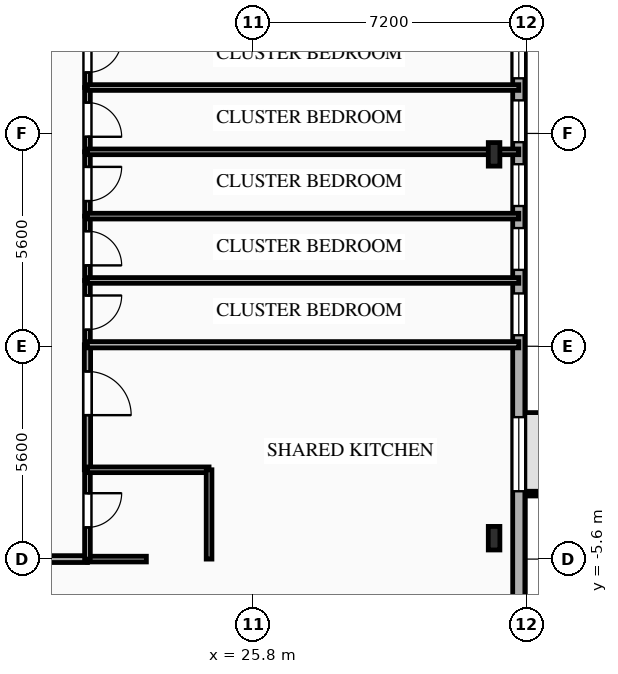
"""IFC4 building model, lengths in metres.
Left out: names, types, materials, properties, quantities, classifications, styles, units other than length and angle.
Written with IfcOpenShell. Run it as: python <this file> out.ifc"""

import sys

from ifc_helpers import new_model, si_unit, direction, frame, frame_2d, origin, origin_2d, place, context, subcontext, project, spatial, rectangle, i_section, extrude, element, fill, save


model = new_model("IFC4")
c1 = context("Model", 3, precision=1e-05, world=origin(), true_north=direction((0.0, 1.0)))
c2 = subcontext(c1, "Body", "Model", "MODEL_VIEW")
j1 = project(units=[si_unit("LENGTHUNIT", "METRE"), si_unit("PLANEANGLEUNIT", "RADIAN")], contexts=[c1])
p1 = place(None, origin())
s1 = spatial("IfcSite", under=j1, at=p1, CompositionType="ELEMENT")
p2 = place(p1, origin())
s2 = spatial("IfcBuilding", under=s1, at=p2, CompositionType="ELEMENT")
p3 = place(p2, frame((0.0, 0.0, 60.5)))
s3 = spatial("IfcBuildingStorey", under=s2, at=p3, CompositionType="ELEMENT", Elevation=60.5)
for number, where, z_axis, x_axis in (
    (1, (32.15, -5.05, 0.0), (0.0, 0.0, 1.0), (1.0, 0.0, 0.0)),
    (2, (32.15, 5.05, 0.0), (0.0, 0.0, 1.0), (1.0, 0.0, 0.0)),
):
    element("IfcColumn", number, at=place(p3, frame(where, z_axis=z_axis, x_axis=x_axis)), inside=s3, PredefinedType="COLUMN", context=c2, shape_type="SweptSolid", body=[
        extrude(i_section(OverallWidth=0.305, OverallDepth=0.62, WebThickness=0.021, FlangeThickness=0.04, FilletRadius=0.027, at=origin_2d()), origin(), (0.0, 0.0, 1.0), 3.35),
    ])
p4 = place(p3, frame((32.8, 15.8, 0.0), z_axis=(0.0, 0.0, 1.0), x_axis=(0.0, -1.0, 0.0)))
e3 = element("IfcWall", 3, at=p4, inside=s3, PredefinedType="SOLIDWALL", context=c2, shape_type="SweptSolid", body=[
    extrude(rectangle(XDim=31.6, YDim=0.32, at=frame_2d((15.8, 0.0))), origin(), (0.0, 0.0, 1.0), 3.035),
])
p5 = place(p4, frame((7.65, 0.0, 0.85)))
e4 = element("IfcOpeningElement", 4, at=p5, cuts=e3, PredefinedType="OPENING", context=c2, shape_type="SweptSolid", body=[
    extrude(rectangle(XDim=1.1, YDim=1.85, at=frame_2d((0.55, 0.925))), frame((0.0, 0.17, 0.0), z_axis=(0.0, -1.0, 0.0), x_axis=(1.0, 0.0, 0.0)), (0.0, 0.0, 1.0), 0.34),
])
p6 = place(p4, frame((9.33, 0.0, 0.85)))
e5 = element("IfcOpeningElement", 5, at=p6, cuts=e3, PredefinedType="OPENING", context=c2, shape_type="SweptSolid", body=[
    extrude(rectangle(XDim=1.1, YDim=1.85, at=frame_2d((0.55, 0.925))), frame((0.0, 0.17, 0.0), z_axis=(0.0, -1.0, 0.0), x_axis=(1.0, 0.0, 0.0)), (0.0, 0.0, 1.0), 0.34),
])
p7 = place(p4, frame((11.01, 0.0, 0.85)))
e6 = element("IfcOpeningElement", 6, at=p7, cuts=e3, PredefinedType="OPENING", context=c2, shape_type="SweptSolid", body=[
    extrude(rectangle(XDim=1.1, YDim=1.85, at=frame_2d((0.55, 0.925))), frame((0.0, 0.17, 0.0), z_axis=(0.0, -1.0, 0.0), x_axis=(1.0, 0.0, 0.0)), (0.0, 0.0, 1.0), 0.34),
])
p8 = place(p4, frame((12.69, 0.0, 0.85)))
e7 = element("IfcOpeningElement", 7, at=p8, cuts=e3, PredefinedType="OPENING", context=c2, shape_type="SweptSolid", body=[
    extrude(rectangle(XDim=1.1, YDim=1.85, at=frame_2d((0.55, 0.925))), frame((0.0, 0.17, 0.0), z_axis=(0.0, -1.0, 0.0), x_axis=(1.0, 0.0, 0.0)), (0.0, 0.0, 1.0), 0.34),
])
p9 = place(p4, frame((14.41, 0.0, 0.85)))
e8 = element("IfcOpeningElement", 8, at=p9, cuts=e3, PredefinedType="OPENING", context=c2, shape_type="SweptSolid", body=[
    extrude(rectangle(XDim=1.1, YDim=1.85, at=frame_2d((0.55, 0.925))), frame((0.0, 0.17, 0.0), z_axis=(0.0, -1.0, 0.0), x_axis=(1.0, 0.0, 0.0)), (0.0, 0.0, 1.0), 0.34),
])
p10 = place(p4, frame((17.665, 0.0, 0.85)))
e9 = element("IfcOpeningElement", 9, at=p10, cuts=e3, PredefinedType="OPENING", context=c2, shape_type="SweptSolid", body=[
    extrude(rectangle(XDim=1.95, YDim=1.85, at=frame_2d((0.975, 0.925))), frame((0.0, 0.17, 0.0), z_axis=(0.0, -1.0, 0.0), x_axis=(1.0, 0.0, 0.0)), (0.0, 0.0, 1.0), 0.34),
])
p11 = place(p3, frame((18.8, -5.6, 0.0), z_axis=(0.0, 0.0, 1.0), x_axis=(1.0, 0.0, 0.0)))
e10 = element("IfcWall", 10, at=p11, inside=s3, PredefinedType="PARTITIONING", context=c2, shape_type="SweptSolid", body=[
    extrude(rectangle(XDim=2.65, YDim=0.18, at=frame_2d((1.325, 0.0))), origin(), (0.0, 0.0, 1.0), 3.035),
])
p12 = place(p3, frame((21.45, -5.6, 0.0), z_axis=(0.0, 0.0, 1.0), x_axis=(1.0, 0.0, 0.0)))
e11 = element("IfcWall", 11, at=p12, inside=s3, PredefinedType="PLUMBINGWALL", context=c2, shape_type="SweptSolid", body=[
    extrude(rectangle(XDim=1.55, YDim=0.15, at=frame_2d((0.775, 0.0))), origin(), (0.0, 0.0, 1.0), 3.035),
])
p13 = place(p3, frame((21.45, -3.25, 0.0), z_axis=(0.0, 0.0, 1.0), x_axis=(0.0, -1.0, 0.0)))
e12 = element("IfcWall", 12, at=p13, inside=s3, PredefinedType="PLUMBINGWALL", context=c2, shape_type="SweptSolid", body=[
    extrude(rectangle(XDim=2.35, YDim=0.15, at=frame_2d((1.175, 0.0))), origin(), (0.0, 0.0, 1.0), 3.035),
])
p14 = place(p13, frame((0.616, 0.0, 0.0)))
e13 = element("IfcOpeningElement", 13, at=p14, cuts=e12, PredefinedType="OPENING", context=c2, shape_type="SweptSolid", body=[
    extrude(rectangle(XDim=0.9, YDim=2.1, at=frame_2d((0.45, 1.05))), frame((0.0, 0.085, 0.0), z_axis=(0.0, -1.0, 0.0), x_axis=(1.0, 0.0, 0.0)), (0.0, 0.0, 1.0), 0.17),
])
p15 = place(p3, frame((21.45, 0.04, 0.0), z_axis=(0.0, 0.0, 1.0), x_axis=(0.0, -1.0, 0.0)))
e14 = element("IfcWall", 14, at=p15, inside=s3, PredefinedType="PARTITIONING", context=c2, shape_type="SweptSolid", body=[
    extrude(rectangle(XDim=3.29, YDim=0.165, at=frame_2d((1.645, 0.0))), origin(), (0.0, 0.0, 1.0), 3.035),
])
p16 = place(p15, frame((0.702, 0.0, 0.0)))
e15 = element("IfcOpeningElement", 15, at=p16, cuts=e14, PredefinedType="OPENING", context=c2, shape_type="SweptSolid", body=[
    extrude(rectangle(XDim=1.15, YDim=2.15, at=frame_2d((0.575, 1.075))), frame((0.0, 0.093, 0.0), z_axis=(0.0, -1.0, 0.0), x_axis=(1.0, 0.0, 0.0)), (0.0, 0.0, 1.0), 0.185),
])
p17 = place(p3, frame((21.45, 1.732, 0.0), z_axis=(0.0, 0.0, 1.0), x_axis=(0.0, -1.0, 0.0)))
e16 = element("IfcWall", 16, at=p17, inside=s3, PredefinedType="PARTITIONING", context=c2, shape_type="SweptSolid", body=[
    extrude(rectangle(XDim=1.692, YDim=0.15, at=frame_2d((0.846, 0.0))), origin(), (0.0, 0.0, 1.0), 3.035),
])
p18 = place(p17, frame((0.396, 0.0, 0.0)))
e17 = element("IfcOpeningElement", 17, at=p18, cuts=e16, PredefinedType="OPENING", context=c2, shape_type="SweptSolid", body=[
    extrude(rectangle(XDim=0.9, YDim=2.1, at=frame_2d((0.45, 1.05))), frame((0.0, 0.085, 0.0), z_axis=(0.0, -1.0, 0.0), x_axis=(1.0, 0.0, 0.0)), (0.0, 0.0, 1.0), 0.17),
])
p19 = place(p3, frame((21.45, 3.424, 0.0), z_axis=(0.0, 0.0, 1.0), x_axis=(0.0, -1.0, 0.0)))
e18 = element("IfcWall", 18, at=p19, inside=s3, PredefinedType="PARTITIONING", context=c2, shape_type="SweptSolid", body=[
    extrude(rectangle(XDim=1.692, YDim=0.15, at=frame_2d((0.846, 0.0))), origin(), (0.0, 0.0, 1.0), 3.035),
])
p20 = place(p19, frame((0.396, 0.0, 0.0)))
e19 = element("IfcOpeningElement", 19, at=p20, cuts=e18, PredefinedType="OPENING", context=c2, shape_type="SweptSolid", body=[
    extrude(rectangle(XDim=0.9, YDim=2.1, at=frame_2d((0.45, 1.05))), frame((0.0, 0.085, 0.0), z_axis=(0.0, -1.0, 0.0), x_axis=(1.0, 0.0, 0.0)), (0.0, 0.0, 1.0), 0.17),
])
p21 = place(p3, frame((21.45, 5.116, 0.0), z_axis=(0.0, 0.0, 1.0), x_axis=(0.0, -1.0, 0.0)))
e20 = element("IfcWall", 20, at=p21, inside=s3, PredefinedType="PARTITIONING", context=c2, shape_type="SweptSolid", body=[
    extrude(rectangle(XDim=1.692, YDim=0.15, at=frame_2d((0.846, 0.0))), origin(), (0.0, 0.0, 1.0), 3.035),
])
p22 = place(p21, frame((0.396, 0.0, 0.0)))
e21 = element("IfcOpeningElement", 21, at=p22, cuts=e20, PredefinedType="OPENING", context=c2, shape_type="SweptSolid", body=[
    extrude(rectangle(XDim=0.9, YDim=2.1, at=frame_2d((0.45, 1.05))), frame((0.0, 0.085, 0.0), z_axis=(0.0, -1.0, 0.0), x_axis=(1.0, 0.0, 0.0)), (0.0, 0.0, 1.0), 0.17),
])
p23 = place(p3, frame((21.45, 6.808, 0.0), z_axis=(0.0, 0.0, 1.0), x_axis=(0.0, -1.0, 0.0)))
e22 = element("IfcWall", 22, at=p23, inside=s3, PredefinedType="PARTITIONING", context=c2, shape_type="SweptSolid", body=[
    extrude(rectangle(XDim=1.692, YDim=0.15, at=frame_2d((0.846, 0.0))), origin(), (0.0, 0.0, 1.0), 3.035),
])
p24 = place(p23, frame((0.396, 0.0, 0.0)))
e23 = element("IfcOpeningElement", 23, at=p24, cuts=e22, PredefinedType="OPENING", context=c2, shape_type="SweptSolid", body=[
    extrude(rectangle(XDim=0.9, YDim=2.1, at=frame_2d((0.45, 1.05))), frame((0.0, 0.085, 0.0), z_axis=(0.0, -1.0, 0.0), x_axis=(1.0, 0.0, 0.0)), (0.0, 0.0, 1.0), 0.17),
])
p25 = place(p3, frame((21.45, 8.5, 0.0), z_axis=(0.0, 0.0, 1.0), x_axis=(0.0, -1.0, 0.0)))
e24 = element("IfcWall", 24, at=p25, inside=s3, PredefinedType="PARTITIONING", context=c2, shape_type="SweptSolid", body=[
    extrude(rectangle(XDim=1.692, YDim=0.15, at=frame_2d((0.846, 0.0))), origin(), (0.0, 0.0, 1.0), 3.035),
])
p26 = place(p25, frame((0.396, 0.0, 0.0)))
e25 = element("IfcOpeningElement", 25, at=p26, cuts=e24, PredefinedType="OPENING", context=c2, shape_type="SweptSolid", body=[
    extrude(rectangle(XDim=0.9, YDim=2.1, at=frame_2d((0.45, 1.05))), frame((0.0, 0.085, 0.0), z_axis=(0.0, -1.0, 0.0), x_axis=(1.0, 0.0, 0.0)), (0.0, 0.0, 1.0), 0.17),
])
p27 = place(p3, frame((21.45, -3.25, 0.0), z_axis=(0.0, 0.0, 1.0), x_axis=(1.0, 0.0, 0.0)))
e26 = element("IfcWall", 26, at=p27, inside=s3, PredefinedType="PLUMBINGWALL", context=c2, shape_type="SweptSolid", body=[
    extrude(rectangle(XDim=3.2, YDim=0.15, at=frame_2d((1.6, 0.0))), origin(), (0.0, 0.0, 1.0), 2.52),
])
p28 = place(p3, frame((24.65, -3.25, 0.0), z_axis=(0.0, 0.0, 1.0), x_axis=(0.0, -1.0, 0.0)))
e27 = element("IfcWall", 27, at=p28, inside=s3, PredefinedType="PLUMBINGWALL", context=c2, shape_type="SweptSolid", body=[
    extrude(rectangle(XDim=2.35, YDim=0.15, at=frame_2d((1.175, 0.0))), origin(), (0.0, 0.0, 1.0), 3.035),
])
p29 = place(p3, frame((21.45, 0.04, 0.0), z_axis=(0.0, 0.0, 1.0), x_axis=(1.0, 0.0, 0.0)))
e28 = element("IfcWall", 28, at=p29, inside=s3, PredefinedType="PARTITIONING", context=c2, shape_type="SweptSolid", body=[
    extrude(rectangle(XDim=11.35, YDim=0.165, at=frame_2d((5.675, 0.0))), origin(), (0.0, 0.0, 1.0), 3.035),
])
p30 = place(p3, frame((21.45, 1.732, 0.0), z_axis=(0.0, 0.0, 1.0), x_axis=(1.0, 0.0, 0.0)))
e29 = element("IfcWall", 29, at=p30, inside=s3, PredefinedType="PARTITIONING", context=c2, shape_type="SweptSolid", body=[
    extrude(rectangle(XDim=11.35, YDim=0.15, at=frame_2d((5.675, 0.0))), origin(), (0.0, 0.0, 1.0), 3.035),
])
for number, where, z_axis, x_axis in (
    (30, (21.45, 3.424, 0.0), (0.0, 0.0, 1.0), (1.0, 0.0, 0.0)),
    (31, (21.45, 5.116, 0.0), (0.0, 0.0, 1.0), (1.0, 0.0, 0.0)),
):
    element("IfcWall", number, at=place(p3, frame(where, z_axis=z_axis, x_axis=x_axis)), inside=s3, PredefinedType="PARTITIONING", context=c2, shape_type="SweptSolid", body=[
        extrude(rectangle(XDim=11.35, YDim=0.15, at=frame_2d((5.675, 0.0))), origin(), (0.0, 0.0, 1.0), 2.52),
    ])
p31 = place(p3, frame((21.45, 6.808, 0.0), z_axis=(0.0, 0.0, 1.0), x_axis=(1.0, 0.0, 0.0)))
e32 = element("IfcWall", 32, at=p31, inside=s3, PredefinedType="PARTITIONING", context=c2, shape_type="SweptSolid", body=[
    extrude(rectangle(XDim=11.35, YDim=0.15, at=frame_2d((5.675, 0.0))), origin(), (0.0, 0.0, 1.0), 3.035),
])
p32 = place(p5, origin())
e33 = element("IfcWindow", 33, at=p32, inside=s3, PartitioningType="SINGLE_PANEL", PredefinedType="WINDOW", context=c2, shape_type="SweptSolid", body=[
    extrude(rectangle(XDim=1.1, YDim=1.85, at=frame_2d((0.55, 0.925))), frame((0.0, 0.03, 0.0), z_axis=(0.0, -1.0, 0.0), x_axis=(1.0, 0.0, 0.0)), (0.0, 0.0, 1.0), 0.06),
])
fill(e4, e33)
p33 = place(p6, origin())
e34 = element("IfcWindow", 34, at=p33, inside=s3, PartitioningType="SINGLE_PANEL", PredefinedType="WINDOW", context=c2, shape_type="SweptSolid", body=[
    extrude(rectangle(XDim=1.1, YDim=1.85, at=frame_2d((0.55, 0.925))), frame((0.0, 0.03, 0.0), z_axis=(0.0, -1.0, 0.0), x_axis=(1.0, 0.0, 0.0)), (0.0, 0.0, 1.0), 0.06),
])
fill(e5, e34)
p34 = place(p7, origin())
e35 = element("IfcWindow", 35, at=p34, inside=s3, PartitioningType="SINGLE_PANEL", PredefinedType="WINDOW", context=c2, shape_type="SweptSolid", body=[
    extrude(rectangle(XDim=1.1, YDim=1.85, at=frame_2d((0.55, 0.925))), frame((0.0, 0.03, 0.0), z_axis=(0.0, -1.0, 0.0), x_axis=(1.0, 0.0, 0.0)), (0.0, 0.0, 1.0), 0.06),
])
fill(e6, e35)
p35 = place(p8, origin())
e36 = element("IfcWindow", 36, at=p35, inside=s3, PartitioningType="SINGLE_PANEL", PredefinedType="WINDOW", context=c2, shape_type="SweptSolid", body=[
    extrude(rectangle(XDim=1.1, YDim=1.85, at=frame_2d((0.55, 0.925))), frame((0.0, 0.03, 0.0), z_axis=(0.0, -1.0, 0.0), x_axis=(1.0, 0.0, 0.0)), (0.0, 0.0, 1.0), 0.06),
])
fill(e7, e36)
p36 = place(p9, origin())
e37 = element("IfcWindow", 37, at=p36, inside=s3, PartitioningType="SINGLE_PANEL", PredefinedType="WINDOW", context=c2, shape_type="SweptSolid", body=[
    extrude(rectangle(XDim=1.1, YDim=1.85, at=frame_2d((0.55, 0.925))), frame((0.0, 0.03, 0.0), z_axis=(0.0, -1.0, 0.0), x_axis=(1.0, 0.0, 0.0)), (0.0, 0.0, 1.0), 0.06),
])
fill(e8, e37)
p37 = place(p10, origin())
e38 = element("IfcWindow", 38, at=p37, inside=s3, PartitioningType="SINGLE_PANEL", PredefinedType="WINDOW", context=c2, shape_type="SweptSolid", body=[
    extrude(rectangle(XDim=1.95, YDim=1.85, at=frame_2d((0.975, 0.925))), frame((0.0, 0.03, 0.0), z_axis=(0.0, -1.0, 0.0), x_axis=(1.0, 0.0, 0.0)), (0.0, 0.0, 1.0), 0.06),
])
fill(e9, e38)
p38 = place(p14, origin())
e39 = element("IfcDoor", 39, at=p38, inside=s3, OperationType="SINGLE_SWING_LEFT", PredefinedType="DOOR", context=c2, shape_type="SweptSolid", body=[
    extrude(rectangle(XDim=0.9, YDim=2.1, at=frame_2d((0.45, 1.05))), frame((0.0, 0.025, 0.0), z_axis=(0.0, -1.0, 0.0), x_axis=(1.0, 0.0, 0.0)), (0.0, 0.0, 1.0), 0.05),
])
fill(e13, e39)
p39 = place(p16, origin())
e40 = element("IfcDoor", 40, at=p39, inside=s3, OperationType="SINGLE_SWING_RIGHT", PredefinedType="DOOR", context=c2, shape_type="SweptSolid", body=[
    extrude(rectangle(XDim=1.15, YDim=2.15, at=frame_2d((0.575, 1.075))), frame((0.0, 0.025, 0.0), z_axis=(0.0, -1.0, 0.0), x_axis=(1.0, 0.0, 0.0)), (0.0, 0.0, 1.0), 0.05),
])
fill(e15, e40)
p40 = place(p18, origin())
e41 = element("IfcDoor", 41, at=p40, inside=s3, OperationType="SINGLE_SWING_LEFT", PredefinedType="DOOR", context=c2, shape_type="SweptSolid", body=[
    extrude(rectangle(XDim=0.9, YDim=2.1, at=frame_2d((0.45, 1.05))), frame((0.0, 0.025, 0.0), z_axis=(0.0, -1.0, 0.0), x_axis=(1.0, 0.0, 0.0)), (0.0, 0.0, 1.0), 0.05),
])
fill(e17, e41)
p41 = place(p20, origin())
e42 = element("IfcDoor", 42, at=p41, inside=s3, OperationType="SINGLE_SWING_RIGHT", PredefinedType="DOOR", context=c2, shape_type="SweptSolid", body=[
    extrude(rectangle(XDim=0.9, YDim=2.1, at=frame_2d((0.45, 1.05))), frame((0.0, 0.025, 0.0), z_axis=(0.0, -1.0, 0.0), x_axis=(1.0, 0.0, 0.0)), (0.0, 0.0, 1.0), 0.05),
])
fill(e19, e42)
p42 = place(p22, origin())
e43 = element("IfcDoor", 43, at=p42, inside=s3, OperationType="SINGLE_SWING_LEFT", PredefinedType="DOOR", context=c2, shape_type="SweptSolid", body=[
    extrude(rectangle(XDim=0.9, YDim=2.1, at=frame_2d((0.45, 1.05))), frame((0.0, 0.025, 0.0), z_axis=(0.0, -1.0, 0.0), x_axis=(1.0, 0.0, 0.0)), (0.0, 0.0, 1.0), 0.05),
])
fill(e21, e43)
p43 = place(p24, origin())
e44 = element("IfcDoor", 44, at=p43, inside=s3, OperationType="SINGLE_SWING_RIGHT", PredefinedType="DOOR", context=c2, shape_type="SweptSolid", body=[
    extrude(rectangle(XDim=0.9, YDim=2.1, at=frame_2d((0.45, 1.05))), frame((0.0, 0.025, 0.0), z_axis=(0.0, -1.0, 0.0), x_axis=(1.0, 0.0, 0.0)), (0.0, 0.0, 1.0), 0.05),
])
fill(e23, e44)
p44 = place(p26, origin())
e45 = element("IfcDoor", 45, at=p44, inside=s3, OperationType="SINGLE_SWING_LEFT", PredefinedType="DOOR", context=c2, shape_type="SweptSolid", body=[
    extrude(rectangle(XDim=0.9, YDim=2.1, at=frame_2d((0.45, 1.05))), frame((0.0, 0.025, 0.0), z_axis=(0.0, -1.0, 0.0), x_axis=(1.0, 0.0, 0.0)), (0.0, 0.0, 1.0), 0.05),
])
fill(e25, e45)
save(model, sys.argv[1])
